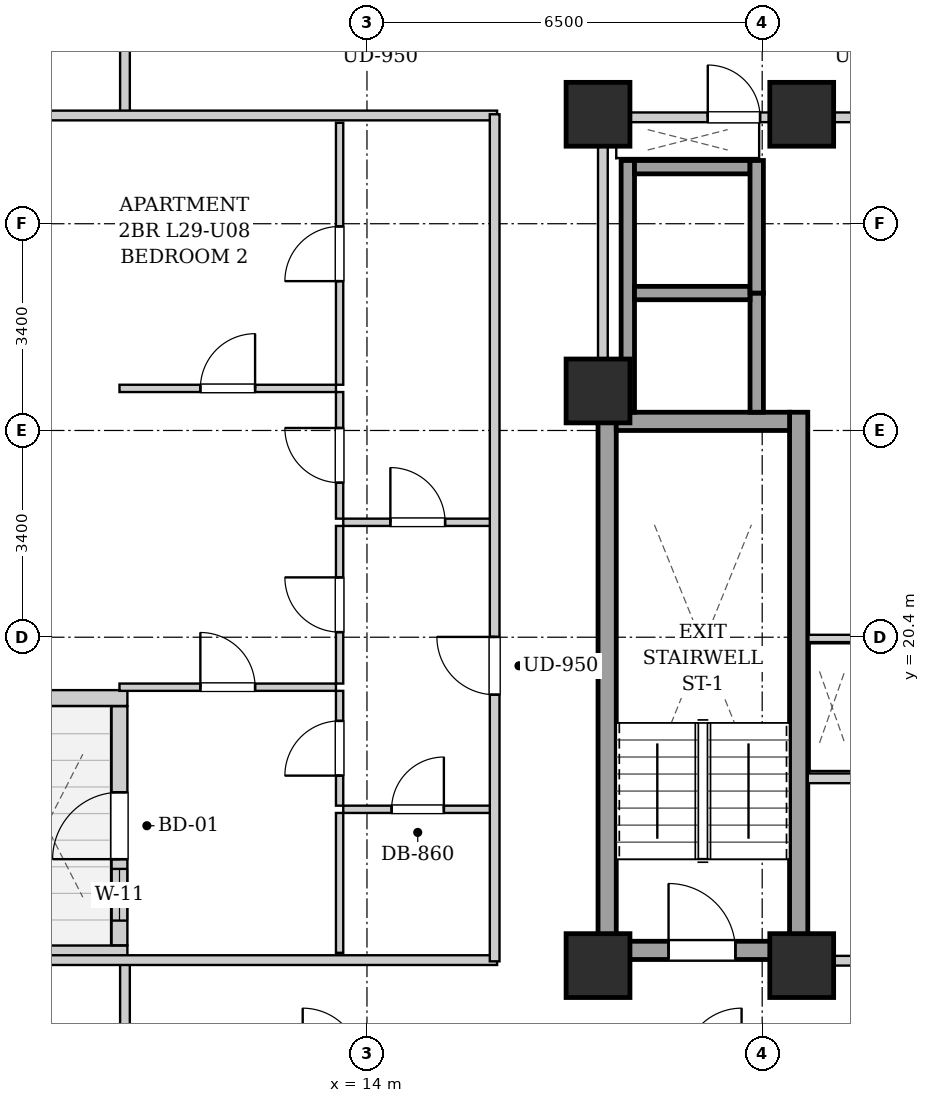
"""IFC4 building model, lengths in metres.
Left out: names, types, materials, properties, quantities, classifications, styles, units other than length and angle.
Written with IfcOpenShell. Run it as: python <this file> out.ifc"""

import sys

from ifc_helpers import new_model, si_unit, direction, frame, frame_2d, origin, origin_2d, place, context, subcontext, project, spatial, rectangle, extrude, element, fill, save


model = new_model("IFC4")
c1 = context("Model", 3, precision=1e-05, world=origin(), true_north=direction((0.0, 1.0)))
c2 = subcontext(c1, "Body", "Model", "MODEL_VIEW")
j1 = project(units=[si_unit("LENGTHUNIT", "METRE"), si_unit("PLANEANGLEUNIT", "RADIAN")], contexts=[c1])
p1 = place(None, origin())
s1 = spatial("IfcSite", under=j1, at=p1, CompositionType="ELEMENT")
p2 = place(p1, origin())
s2 = spatial("IfcBuilding", under=s1, at=p2, CompositionType="ELEMENT")
p3 = place(p2, frame((0.0, 0.0, 103.9)))
s3 = spatial("IfcBuildingStorey", under=s2, at=p3, CompositionType="ELEMENT", Elevation=103.9)
for number, where, z_axis, x_axis in (
    (1, (17.8, 15.0, 0.0), (0.0, 0.0, 1.0), (1.0, 0.0, 0.0)),
    (2, (21.15, 15.0, 0.0), (0.0, 0.0, 1.0), (1.0, 0.0, 0.0)),
    (3, (17.8, 29.0, 0.0), (0.0, 0.0, 1.0), (1.0, 0.0, 0.0)),
    (4, (21.15, 29.0, 0.0), (0.0, 0.0, 1.0), (1.0, 0.0, 0.0)),
    (5, (17.8, 24.45, 0.0), (0.0, 0.0, 1.0), (1.0, 0.0, 0.0)),
):
    element("IfcColumn", number, at=place(p3, frame(where, z_axis=z_axis, x_axis=x_axis)), inside=s3, PredefinedType="COLUMN", context=c2, shape_type="SweptSolid", body=[
        extrude(rectangle(XDim=1.05, YDim=1.05, at=origin_2d()), origin(), (0.0, 0.0, 1.0), 3.2),
    ])
p4 = place(p3, frame((7.66, 15.2, 0.0), z_axis=(0.0, 0.0, 1.0), x_axis=(1.0, 0.0, 0.0)))
e6 = element("IfcWall", 6, at=p4, inside=s3, PredefinedType="SOLIDWALL", context=c2, shape_type="SweptSolid", body=[
    extrude(rectangle(XDim=2.4, YDim=0.26, at=frame_2d((1.2, 0.0))), origin(), (0.0, 0.0, 1.0), 2.94),
])
p5 = place(p3, frame((9.93, 15.334, 0.0), z_axis=(0.0, 0.0, 1.0), x_axis=(0.0, 1.0, 0.0)))
e7 = element("IfcWall", 7, at=p5, inside=s3, PredefinedType="SOLIDWALL", context=c2, shape_type="SweptSolid", body=[
    extrude(rectangle(XDim=3.932, YDim=0.26, at=frame_2d((1.966, 0.0))), origin(), (0.0, 0.0, 1.0), 2.94),
])
p6 = place(p5, frame((1.416, 0.0, 0.0)))
e8 = element("IfcOpeningElement", 8, at=p6, cuts=e7, PredefinedType="OPENING", context=c2, shape_type="SweptSolid", body=[
    extrude(rectangle(XDim=1.1, YDim=2.0, at=frame_2d((0.55, 1.0))), frame((0.0, 0.14, 0.0), z_axis=(0.0, -1.0, 0.0), x_axis=(1.0, 0.0, 0.0)), (0.0, 0.0, 1.0), 0.28),
])
p7 = place(p5, frame((0.406, 0.0, 0.55)))
e9 = element("IfcOpeningElement", 9, at=p7, cuts=e7, PredefinedType="OPENING", context=c2, shape_type="SweptSolid", body=[
    extrude(rectangle(XDim=0.85, YDim=1.2, at=frame_2d((0.425, 0.6))), frame((0.0, 0.14, 0.0), z_axis=(0.0, -1.0, 0.0), x_axis=(1.0, 0.0, 0.0)), (0.0, 0.0, 1.0), 0.28),
])
p8 = place(p3, frame((10.06, 19.4, 0.0), z_axis=(0.0, 0.0, 1.0), x_axis=(-1.0, 0.0, 0.0)))
e10 = element("IfcWall", 10, at=p8, inside=s3, PredefinedType="SOLIDWALL", context=c2, shape_type="SweptSolid", body=[
    extrude(rectangle(XDim=2.4, YDim=0.26, at=frame_2d((1.2, 0.0))), origin(), (0.0, 0.0, 1.0), 2.94),
])
for number, where, z_axis, x_axis in (
    (11, (17.95, 15.1, 0.0), (0.0, 0.0, 1.0), (0.0, 1.0, 0.0)),
    (12, (21.1, 15.1, 0.0), (0.0, 0.0, 1.0), (0.0, 1.0, 0.0)),
):
    element("IfcWall", number, at=place(p3, frame(where, z_axis=z_axis, x_axis=x_axis)), inside=s3, PredefinedType="SHEAR", context=c2, shape_type="SweptSolid", body=[
        extrude(rectangle(XDim=9.0, YDim=0.3, at=frame_2d((4.5, 0.0))), origin(), (0.0, 0.0, 1.0), 2.94),
    ])
p9 = place(p3, frame((18.1, 23.95, 0.0), z_axis=(0.0, 0.0, 1.0), x_axis=(1.0, 0.0, 0.0)))
e13 = element("IfcWall", 13, at=p9, inside=s3, PredefinedType="SHEAR", context=c2, shape_type="SweptSolid", body=[
    extrude(rectangle(XDim=2.85, YDim=0.3, at=frame_2d((1.425, 0.0))), origin(), (0.0, 0.0, 1.0), 2.94),
])
p10 = place(p3, frame((18.1, 15.25, 0.0), z_axis=(0.0, 0.0, 1.0), x_axis=(1.0, 0.0, 0.0)))
e14 = element("IfcWall", 14, at=p10, inside=s3, PredefinedType="SHEAR", context=c2, shape_type="SweptSolid", body=[
    extrude(rectangle(XDim=2.85, YDim=0.3, at=frame_2d((1.425, 0.0))), origin(), (0.0, 0.0, 1.0), 2.94),
])
p11 = place(p10, frame((0.86, 0.0, 0.0)))
e15 = element("IfcOpeningElement", 15, at=p11, cuts=e14, PredefinedType="OPENING", context=c2, shape_type="SweptSolid", body=[
    extrude(rectangle(XDim=1.1, YDim=2.05, at=frame_2d((0.55, 1.025))), frame((0.0, 0.16, 0.0), z_axis=(0.0, -1.0, 0.0), x_axis=(1.0, 0.0, 0.0)), (0.0, 0.0, 1.0), 0.32),
])
p12 = place(p3, frame((18.29, 24.1, 0.0), z_axis=(0.0, 0.0, 1.0), x_axis=(0.0, 1.0, 0.0)))
e16 = element("IfcWall", 16, at=p12, inside=s3, PredefinedType="SHEAR", context=c2, shape_type="SweptSolid", body=[
    extrude(rectangle(XDim=4.14, YDim=0.22, at=frame_2d((2.07, 0.0))), origin(), (0.0, 0.0, 1.0), 2.94),
])
p13 = place(p3, frame((20.41, 24.1, 0.0), z_axis=(0.0, 0.0, 1.0), x_axis=(0.0, 1.0, 0.0)))
e17 = element("IfcWall", 17, at=p13, inside=s3, PredefinedType="SHEAR", context=c2, shape_type="SweptSolid", body=[
    extrude(rectangle(XDim=1.96, YDim=0.22, at=frame_2d((0.98, 0.0))), origin(), (0.0, 0.0, 1.0), 2.94),
])
for number, where, z_axis, x_axis in (
    (18, (18.4, 26.06, 0.0), (0.0, 0.0, 1.0), (1.0, 0.0, 0.0)),
    (19, (18.4, 28.13, 0.0), (0.0, 0.0, 1.0), (1.0, 0.0, 0.0)),
):
    element("IfcWall", number, at=place(p3, frame(where, z_axis=z_axis, x_axis=x_axis)), inside=s3, PredefinedType="SHEAR", context=c2, shape_type="SweptSolid", body=[
        extrude(rectangle(XDim=1.9, YDim=0.22, at=frame_2d((0.95, 0.0))), origin(), (0.0, 0.0, 1.0), 2.94),
    ])
p14 = place(p3, frame((20.41, 26.06, 0.0), z_axis=(0.0, 0.0, 1.0), x_axis=(0.0, 1.0, 0.0)))
e20 = element("IfcWall", 20, at=p14, inside=s3, PredefinedType="SHEAR", context=c2, shape_type="SweptSolid", body=[
    extrude(rectangle(XDim=2.18, YDim=0.22, at=frame_2d((1.09, 0.0))), origin(), (0.0, 0.0, 1.0), 2.94),
])
p15 = place(p3, frame((21.25, 15.08, 0.0), z_axis=(0.0, 0.0, 1.0), x_axis=(1.0, 0.0, 0.0)))
e21 = element("IfcWall", 21, at=p15, inside=s3, PredefinedType="PARTITIONING", context=c2, shape_type="SweptSolid", body=[
    extrude(rectangle(XDim=8.5, YDim=0.16, at=frame_2d((4.25, 0.0))), origin(), (0.0, 0.0, 1.0), 2.313),
])
p16 = place(p15, frame((3.725, 0.0, 0.0)))
e22 = element("IfcOpeningElement", 22, at=p16, cuts=e21, PredefinedType="OPENING", context=c2, shape_type="SweptSolid", body=[
    extrude(rectangle(XDim=1.05, YDim=2.05, at=frame_2d((0.525, 1.025))), frame((0.0, 0.09, 0.0), z_axis=(0.0, -1.0, 0.0), x_axis=(1.0, 0.0, 0.0)), (0.0, 0.0, 1.0), 0.18),
])
p17 = place(p3, frame((21.25, 18.08, 0.0), z_axis=(0.0, 0.0, 1.0), x_axis=(1.0, 0.0, 0.0)))
e23 = element("IfcWall", 23, at=p17, inside=s3, PredefinedType="PARTITIONING", context=c2, shape_type="SweptSolid", body=[
    extrude(rectangle(XDim=1.1, YDim=0.16, at=frame_2d((0.55, 0.0))), origin(), (0.0, 0.0, 1.0), 2.94),
])
p18 = place(p3, frame((17.88, 24.12, 0.0), z_axis=(0.0, 0.0, 1.0), x_axis=(0.0, 1.0, 0.0)))
e24 = element("IfcWall", 24, at=p18, inside=s3, PredefinedType="PARTITIONING", context=c2, shape_type="SweptSolid", body=[
    extrude(rectangle(XDim=4.76, YDim=0.16, at=frame_2d((2.38, 0.0))), origin(), (0.0, 0.0, 1.0), 2.94),
])
p19 = place(p3, frame((17.96, 28.95, 0.0), z_axis=(0.0, 0.0, 1.0), x_axis=(1.0, 0.0, 0.0)))
e25 = element("IfcWall", 25, at=p19, inside=s3, PredefinedType="PARTITIONING", context=c2, shape_type="SweptSolid", body=[
    extrude(rectangle(XDim=4.29, YDim=0.16, at=frame_2d((2.145, 0.0))), origin(), (0.0, 0.0, 1.0), 2.313),
])
p20 = place(p19, frame((1.645, 0.0, 0.0)))
e26 = element("IfcOpeningElement", 26, at=p20, cuts=e25, PredefinedType="OPENING", context=c2, shape_type="SweptSolid", body=[
    extrude(rectangle(XDim=0.86, YDim=2.05, at=frame_2d((0.43, 1.025))), frame((0.0, 0.09, 0.0), z_axis=(0.0, -1.0, 0.0), x_axis=(1.0, 0.0, 0.0)), (0.0, 0.0, 1.0), 0.18),
])
p21 = place(p3, frame((22.28, 20.38, 0.0), z_axis=(0.0, 0.0, 1.0), x_axis=(-1.0, 0.0, 0.0)))
e27 = element("IfcWall", 27, at=p21, inside=s3, PredefinedType="PARTITIONING", context=c2, shape_type="SweptSolid", body=[
    extrude(rectangle(XDim=1.02, YDim=0.12, at=frame_2d((0.51, 0.0))), origin(), (0.0, 0.0, 1.0), 2.94),
])
for number, where, z_axis, x_axis in (
    (28, (10.02, 13.35, 0.0), (0.0, 0.0, 1.0), (0.0, 1.0, 0.0)),
    (29, (10.02, 28.98, 0.0), (0.0, 0.0, 1.0), (0.0, 1.0, 0.0)),
):
    element("IfcWall", number, at=place(p3, frame(where, z_axis=z_axis, x_axis=x_axis)), inside=s3, PredefinedType="PARTITIONING", context=c2, shape_type="SweptSolid", body=[
        extrude(rectangle(XDim=1.74, YDim=0.16, at=frame_2d((0.87, 0.0))), origin(), (0.0, 0.0, 1.0), 2.94),
    ])
for number, where, z_axis, x_axis in (
    (30, (7.78, 15.09, 0.0), (0.0, 0.0, 1.0), (1.0, 0.0, 0.0)),
    (31, (7.78, 28.98, 0.0), (0.0, 0.0, 1.0), (1.0, 0.0, 0.0)),
):
    element("IfcWall", number, at=place(p3, frame(where, z_axis=z_axis, x_axis=x_axis)), inside=s3, PredefinedType="PARTITIONING", context=c2, shape_type="SweptSolid", body=[
        extrude(rectangle(XDim=8.36, YDim=0.16, at=frame_2d((4.18, 0.0))), origin(), (0.0, 0.0, 1.0), 2.313),
    ])
p22 = place(p3, frame((13.61, 22.29, 0.0), z_axis=(0.0, 0.0, 1.0), x_axis=(1.0, 0.0, 0.0)))
e32 = element("IfcWall", 32, at=p22, inside=s3, PredefinedType="PARTITIONING", context=c2, shape_type="SweptSolid", body=[
    extrude(rectangle(XDim=2.45, YDim=0.12, at=frame_2d((1.225, 0.0))), origin(), (0.0, 0.0, 1.0), 2.94),
])
p23 = place(p22, frame((0.775, 0.0, 0.0)))
e33 = element("IfcOpeningElement", 33, at=p23, cuts=e32, PredefinedType="OPENING", context=c2, shape_type="SweptSolid", body=[
    extrude(rectangle(XDim=0.9, YDim=2.05, at=frame_2d((0.45, 1.025))), frame((0.0, 0.07, 0.0), z_axis=(0.0, -1.0, 0.0), x_axis=(1.0, 0.0, 0.0)), (0.0, 0.0, 1.0), 0.14),
])
p24 = place(p3, frame((13.55, 22.35, 0.0), z_axis=(0.0, 0.0, 1.0), x_axis=(0.0, 1.0, 0.0)))
e34 = element("IfcWall", 34, at=p24, inside=s3, PredefinedType="PARTITIONING", context=c2, shape_type="SweptSolid", body=[
    extrude(rectangle(XDim=2.082, YDim=0.12, at=frame_2d((1.041, 0.0))), origin(), (0.0, 0.0, 1.0), 2.94),
])
p25 = place(p24, frame((0.591, 0.0, 0.0)))
e35 = element("IfcOpeningElement", 35, at=p25, cuts=e34, PredefinedType="OPENING", context=c2, shape_type="SweptSolid", body=[
    extrude(rectangle(XDim=0.9, YDim=2.05, at=frame_2d((0.45, 1.025))), frame((0.0, 0.07, 0.0), z_axis=(0.0, -1.0, 0.0), x_axis=(1.0, 0.0, 0.0)), (0.0, 0.0, 1.0), 0.14),
])
p26 = place(p3, frame((13.55, 24.552, 0.0), z_axis=(0.0, 0.0, 1.0), x_axis=(0.0, 1.0, 0.0)))
e36 = element("IfcWall", 36, at=p26, inside=s3, PredefinedType="PARTITIONING", context=c2, shape_type="SweptSolid", body=[
    extrude(rectangle(XDim=4.308, YDim=0.12, at=frame_2d((2.154, 0.0))), origin(), (0.0, 0.0, 1.0), 2.94),
])
p27 = place(p26, frame((1.704, 0.0, 0.0)))
e37 = element("IfcOpeningElement", 37, at=p27, cuts=e36, PredefinedType="OPENING", context=c2, shape_type="SweptSolid", body=[
    extrude(rectangle(XDim=0.9, YDim=2.05, at=frame_2d((0.45, 1.025))), frame((0.0, 0.07, 0.0), z_axis=(0.0, -1.0, 0.0), x_axis=(1.0, 0.0, 0.0)), (0.0, 0.0, 1.0), 0.14),
])
p28 = place(p3, frame((13.61, 17.57, 0.0), z_axis=(0.0, 0.0, 1.0), x_axis=(1.0, 0.0, 0.0)))
e38 = element("IfcWall", 38, at=p28, inside=s3, PredefinedType="PARTITIONING", context=c2, shape_type="SweptSolid", body=[
    extrude(rectangle(XDim=2.45, YDim=0.12, at=frame_2d((1.225, 0.0))), origin(), (0.0, 0.0, 1.0), 2.94),
])
p29 = place(p28, frame((0.795, 0.0, 0.0)))
e39 = element("IfcOpeningElement", 39, at=p29, cuts=e38, PredefinedType="OPENING", context=c2, shape_type="SweptSolid", body=[
    extrude(rectangle(XDim=0.86, YDim=2.05, at=frame_2d((0.43, 1.025))), frame((0.0, 0.07, 0.0), z_axis=(0.0, -1.0, 0.0), x_axis=(1.0, 0.0, 0.0)), (0.0, 0.0, 1.0), 0.14),
])
p30 = place(p3, frame((13.55, 15.21, 0.0), z_axis=(0.0, 0.0, 1.0), x_axis=(0.0, 1.0, 0.0)))
e40 = element("IfcWall", 40, at=p30, inside=s3, PredefinedType="PARTITIONING", context=c2, shape_type="SweptSolid", body=[
    extrude(rectangle(XDim=2.3, YDim=0.12, at=frame_2d((1.15, 0.0))), origin(), (0.0, 0.0, 1.0), 2.94),
])
p31 = place(p3, frame((13.55, 17.63, 0.0), z_axis=(0.0, 0.0, 1.0), x_axis=(0.0, 1.0, 0.0)))
e41 = element("IfcWall", 41, at=p31, inside=s3, PredefinedType="PARTITIONING", context=c2, shape_type="SweptSolid", body=[
    extrude(rectangle(XDim=1.888, YDim=0.12, at=frame_2d((0.944, 0.0))), origin(), (0.0, 0.0, 1.0), 2.94),
])
p32 = place(p31, frame((0.494, 0.0, 0.0)))
e42 = element("IfcOpeningElement", 42, at=p32, cuts=e41, PredefinedType="OPENING", context=c2, shape_type="SweptSolid", body=[
    extrude(rectangle(XDim=0.9, YDim=2.05, at=frame_2d((0.45, 1.025))), frame((0.0, 0.07, 0.0), z_axis=(0.0, -1.0, 0.0), x_axis=(1.0, 0.0, 0.0)), (0.0, 0.0, 1.0), 0.14),
])
p33 = place(p3, frame((13.55, 19.638, 0.0), z_axis=(0.0, 0.0, 1.0), x_axis=(0.0, 1.0, 0.0)))
e43 = element("IfcWall", 43, at=p33, inside=s3, PredefinedType="PARTITIONING", context=c2, shape_type="SweptSolid", body=[
    extrude(rectangle(XDim=2.592, YDim=0.12, at=frame_2d((1.296, 0.0))), origin(), (0.0, 0.0, 1.0), 2.94),
])
p34 = place(p33, frame((0.846, 0.0, 0.0)))
e44 = element("IfcOpeningElement", 44, at=p34, cuts=e43, PredefinedType="OPENING", context=c2, shape_type="SweptSolid", body=[
    extrude(rectangle(XDim=0.9, YDim=2.05, at=frame_2d((0.45, 1.025))), frame((0.0, 0.07, 0.0), z_axis=(0.0, -1.0, 0.0), x_axis=(1.0, 0.0, 0.0)), (0.0, 0.0, 1.0), 0.14),
])
p35 = place(p3, frame((9.93, 19.578, 0.0), z_axis=(0.0, 0.0, 1.0), x_axis=(1.0, 0.0, 0.0)))
e45 = element("IfcWall", 45, at=p35, inside=s3, PredefinedType="PARTITIONING", context=c2, shape_type="SweptSolid", body=[
    extrude(rectangle(XDim=3.56, YDim=0.12, at=frame_2d((1.78, 0.0))), origin(), (0.0, 0.0, 1.0), 2.94),
])
p36 = place(p35, frame((1.33, 0.0, 0.0)))
e46 = element("IfcOpeningElement", 46, at=p36, cuts=e45, PredefinedType="OPENING", context=c2, shape_type="SweptSolid", body=[
    extrude(rectangle(XDim=0.9, YDim=2.05, at=frame_2d((0.45, 1.025))), frame((0.0, 0.07, 0.0), z_axis=(0.0, -1.0, 0.0), x_axis=(1.0, 0.0, 0.0)), (0.0, 0.0, 1.0), 0.14),
])
p37 = place(p3, frame((9.93, 24.492, 0.0), z_axis=(0.0, 0.0, 1.0), x_axis=(1.0, 0.0, 0.0)))
e47 = element("IfcWall", 47, at=p37, inside=s3, PredefinedType="PARTITIONING", context=c2, shape_type="SweptSolid", body=[
    extrude(rectangle(XDim=3.56, YDim=0.12, at=frame_2d((1.78, 0.0))), origin(), (0.0, 0.0, 1.0), 2.518),
])
p38 = place(p37, frame((1.33, 0.0, 0.0)))
e48 = element("IfcOpeningElement", 48, at=p38, cuts=e47, PredefinedType="OPENING", context=c2, shape_type="SweptSolid", body=[
    extrude(rectangle(XDim=0.9, YDim=2.05, at=frame_2d((0.45, 1.025))), frame((0.0, 0.07, 0.0), z_axis=(0.0, -1.0, 0.0), x_axis=(1.0, 0.0, 0.0)), (0.0, 0.0, 1.0), 0.14),
])
p39 = place(p3, frame((16.1, 15.07, 0.0), z_axis=(0.0, 0.0, 1.0), x_axis=(0.0, 1.0, 0.0)))
e49 = element("IfcWall", 49, at=p39, inside=s3, PredefinedType="PARTITIONING", context=c2, shape_type="SweptSolid", body=[
    extrude(rectangle(XDim=13.93, YDim=0.16, at=frame_2d((6.965, 0.0))), origin(), (0.0, 0.0, 1.0), 2.94),
])
p40 = place(p39, frame((4.385, 0.0, 0.0)))
e50 = element("IfcOpeningElement", 50, at=p40, cuts=e49, PredefinedType="OPENING", context=c2, shape_type="SweptSolid", body=[
    extrude(rectangle(XDim=0.95, YDim=2.1, at=frame_2d((0.475, 1.05))), frame((0.0, 0.09, 0.0), z_axis=(0.0, -1.0, 0.0), x_axis=(1.0, 0.0, 0.0)), (0.0, 0.0, 1.0), 0.18),
])
p41 = place(p11, origin())
e51 = element("IfcDoor", 51, at=p41, inside=s3, OperationType="SINGLE_SWING_LEFT", PredefinedType="DOOR", context=c2, shape_type="SweptSolid", body=[
    extrude(rectangle(XDim=1.1, YDim=2.05, at=frame_2d((0.55, 1.025))), frame((0.0, 0.025, 0.0), z_axis=(0.0, -1.0, 0.0), x_axis=(1.0, 0.0, 0.0)), (0.0, 0.0, 1.0), 0.05),
])
fill(e15, e51)
p42 = place(p20, origin())
e52 = element("IfcDoor", 52, at=p42, inside=s3, OperationType="SINGLE_SWING_LEFT", PredefinedType="DOOR", context=c2, shape_type="SweptSolid", body=[
    extrude(rectangle(XDim=0.86, YDim=2.05, at=frame_2d((0.43, 1.025))), frame((0.0, 0.025, 0.0), z_axis=(0.0, -1.0, 0.0), x_axis=(1.0, 0.0, 0.0)), (0.0, 0.0, 1.0), 0.05),
])
fill(e26, e52)
p43 = place(p23, origin())
e53 = element("IfcDoor", 53, at=p43, inside=s3, OperationType="SINGLE_SWING_LEFT", PredefinedType="DOOR", context=c2, shape_type="SweptSolid", body=[
    extrude(rectangle(XDim=0.9, YDim=2.05, at=frame_2d((0.45, 1.025))), frame((0.0, 0.025, 0.0), z_axis=(0.0, -1.0, 0.0), x_axis=(1.0, 0.0, 0.0)), (0.0, 0.0, 1.0), 0.05),
])
fill(e33, e53)
p44 = place(p25, origin())
e54 = element("IfcDoor", 54, at=p44, inside=s3, OperationType="SINGLE_SWING_RIGHT", PredefinedType="DOOR", context=c2, shape_type="SweptSolid", body=[
    extrude(rectangle(XDim=0.9, YDim=2.05, at=frame_2d((0.45, 1.025))), frame((0.0, 0.025, 0.0), z_axis=(0.0, -1.0, 0.0), x_axis=(1.0, 0.0, 0.0)), (0.0, 0.0, 1.0), 0.05),
])
fill(e35, e54)
p45 = place(p27, origin())
e55 = element("IfcDoor", 55, at=p45, inside=s3, OperationType="SINGLE_SWING_LEFT", PredefinedType="DOOR", context=c2, shape_type="SweptSolid", body=[
    extrude(rectangle(XDim=0.9, YDim=2.05, at=frame_2d((0.45, 1.025))), frame((0.0, 0.025, 0.0), z_axis=(0.0, -1.0, 0.0), x_axis=(1.0, 0.0, 0.0)), (0.0, 0.0, 1.0), 0.05),
])
fill(e37, e55)
p46 = place(p29, origin())
e56 = element("IfcDoor", 56, at=p46, inside=s3, OperationType="SINGLE_SWING_RIGHT", PredefinedType="DOOR", context=c2, shape_type="SweptSolid", body=[
    extrude(rectangle(XDim=0.86, YDim=2.05, at=frame_2d((0.43, 1.025))), frame((0.0, 0.025, 0.0), z_axis=(0.0, -1.0, 0.0), x_axis=(1.0, 0.0, 0.0)), (0.0, 0.0, 1.0), 0.05),
])
fill(e39, e56)
p47 = place(p32, origin())
e57 = element("IfcDoor", 57, at=p47, inside=s3, OperationType="SINGLE_SWING_LEFT", PredefinedType="DOOR", context=c2, shape_type="SweptSolid", body=[
    extrude(rectangle(XDim=0.9, YDim=2.05, at=frame_2d((0.45, 1.025))), frame((0.0, 0.025, 0.0), z_axis=(0.0, -1.0, 0.0), x_axis=(1.0, 0.0, 0.0)), (0.0, 0.0, 1.0), 0.05),
])
fill(e42, e57)
p48 = place(p34, origin())
e58 = element("IfcDoor", 58, at=p48, inside=s3, OperationType="SINGLE_SWING_RIGHT", PredefinedType="DOOR", context=c2, shape_type="SweptSolid", body=[
    extrude(rectangle(XDim=0.9, YDim=2.05, at=frame_2d((0.45, 1.025))), frame((0.0, 0.025, 0.0), z_axis=(0.0, -1.0, 0.0), x_axis=(1.0, 0.0, 0.0)), (0.0, 0.0, 1.0), 0.05),
])
fill(e44, e58)
p49 = place(p36, origin())
e59 = element("IfcDoor", 59, at=p49, inside=s3, OperationType="SINGLE_SWING_LEFT", PredefinedType="DOOR", context=c2, shape_type="SweptSolid", body=[
    extrude(rectangle(XDim=0.9, YDim=2.05, at=frame_2d((0.45, 1.025))), frame((0.0, 0.025, 0.0), z_axis=(0.0, -1.0, 0.0), x_axis=(1.0, 0.0, 0.0)), (0.0, 0.0, 1.0), 0.05),
])
fill(e46, e59)
p50 = place(p38, origin())
e60 = element("IfcDoor", 60, at=p50, inside=s3, OperationType="SINGLE_SWING_RIGHT", PredefinedType="DOOR", context=c2, shape_type="SweptSolid", body=[
    extrude(rectangle(XDim=0.9, YDim=2.05, at=frame_2d((0.45, 1.025))), frame((0.0, 0.025, 0.0), z_axis=(0.0, -1.0, 0.0), x_axis=(1.0, 0.0, 0.0)), (0.0, 0.0, 1.0), 0.05),
])
fill(e48, e60)
p51 = place(p40, origin())
e61 = element("IfcDoor", 61, at=p51, inside=s3, OperationType="SINGLE_SWING_RIGHT", PredefinedType="DOOR", context=c2, shape_type="SweptSolid", body=[
    extrude(rectangle(XDim=0.95, YDim=2.1, at=frame_2d((0.475, 1.05))), frame((0.0, 0.025, 0.0), z_axis=(0.0, -1.0, 0.0), x_axis=(1.0, 0.0, 0.0)), (0.0, 0.0, 1.0), 0.05),
])
fill(e50, e61)
p52 = place(p6, origin())
e62 = element("IfcDoor", 62, at=p52, inside=s3, OperationType="SINGLE_SWING_LEFT", PredefinedType="DOOR", context=c2, shape_type="SweptSolid", body=[
    extrude(rectangle(XDim=1.1, YDim=2.0, at=frame_2d((0.55, 1.0))), frame((0.0, 0.025, 0.0), z_axis=(0.0, -1.0, 0.0), x_axis=(1.0, 0.0, 0.0)), (0.0, 0.0, 1.0), 0.05),
])
fill(e8, e62)
p53 = place(p7, origin())
e63 = element("IfcWindow", 63, at=p53, inside=s3, PartitioningType="SINGLE_PANEL", PredefinedType="WINDOW", context=c2, shape_type="SweptSolid", body=[
    extrude(rectangle(XDim=0.85, YDim=1.2, at=frame_2d((0.425, 0.6))), frame((0.0, 0.03, 0.0), z_axis=(0.0, -1.0, 0.0), x_axis=(1.0, 0.0, 0.0)), (0.0, 0.0, 1.0), 0.06),
])
fill(e9, e63)
save(model, sys.argv[1])
